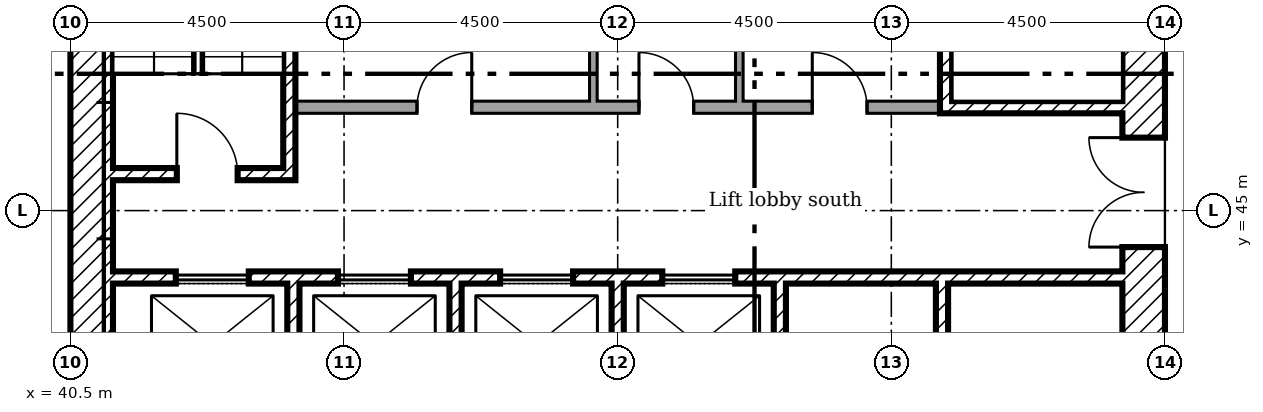
"""IFC4 building model, lengths in metres.
Left out: names, types, materials, properties, quantities, classifications, styles, units other than length and angle.
Written with IfcOpenShell. Run it as: python <this file> out.ifc"""

import sys

from ifc_helpers import new_model, si_unit, direction, frame, frame_2d, origin, place, context, subcontext, project, spatial, rectangle, extrude, element, fill, save


model = new_model("IFC4")
c1 = context("Model", 3, precision=1e-05, world=origin(), true_north=direction((0.0, 1.0)))
c2 = subcontext(c1, "Body", "Model", "MODEL_VIEW")
j1 = project(units=[si_unit("LENGTHUNIT", "METRE"), si_unit("PLANEANGLEUNIT", "RADIAN")], contexts=[c1])
p1 = place(None, origin())
s1 = spatial("IfcSite", under=j1, at=p1, CompositionType="ELEMENT")
p2 = place(p1, origin())
s2 = spatial("IfcBuilding", under=s1, at=p2, CompositionType="ELEMENT")
p3 = place(p2, frame((0.0, 0.0, 128.0)))
s3 = spatial("IfcBuildingStorey", under=s2, at=p3, CompositionType="ELEMENT", Elevation=128.0)
p4 = place(p3, frame((58.15, 40.5, 0.0), z_axis=(0.0, 0.0, 1.0), x_axis=(0.0, 1.0, 0.0)))
e1 = element("IfcWall", 1, at=p4, inside=s3, PredefinedType="SHEAR", context=c2, shape_type="SweptSolid", body=[
    extrude(rectangle(XDim=18.0, YDim=0.7, at=frame_2d((9.0, 0.0))), origin(), (0.0, 0.0, 1.0), 3.35),
])
p5 = place(p4, frame((13.15, 0.0, 0.0)))
e2 = element("IfcOpeningElement", 2, at=p5, cuts=e1, PredefinedType="OPENING", context=c2, shape_type="SweptSolid", body=[
    extrude(rectangle(XDim=1.2, YDim=2.1, at=frame_2d((0.6, 1.05))), frame((0.0, 0.36, 0.0), z_axis=(0.0, -1.0, 0.0), x_axis=(1.0, 0.0, 0.0)), (0.0, 0.0, 1.0), 0.72),
])
p6 = place(p4, frame((3.9, 0.0, 0.0)))
e3 = element("IfcOpeningElement", 3, at=p6, cuts=e1, PredefinedType="OPENING", context=c2, shape_type="SweptSolid", body=[
    extrude(rectangle(XDim=1.8, YDim=2.1, at=frame_2d((0.9, 1.05))), frame((0.0, 0.36, 0.0), z_axis=(0.0, -1.0, 0.0), x_axis=(1.0, 0.0, 0.0)), (0.0, 0.0, 1.0), 0.72),
])
p7 = place(p4, frame((11.525, 0.0, 0.0)))
e4 = element("IfcOpeningElement", 4, at=p7, cuts=e1, PredefinedType="OPENING", context=c2, shape_type="SweptSolid", body=[
    extrude(rectangle(XDim=1.0, YDim=2.1, at=frame_2d((0.5, 1.05))), frame((0.0, 0.36, 0.0), z_axis=(0.0, -1.0, 0.0), x_axis=(1.0, 0.0, 0.0)), (0.0, 0.0, 1.0), 0.72),
])
p8 = place(p3, frame((40.85, 40.5, 0.0), z_axis=(0.0, 0.0, 1.0), x_axis=(0.0, 1.0, 0.0)))
e5 = element("IfcWall", 5, at=p8, inside=s3, PredefinedType="SHEAR", context=c2, shape_type="SweptSolid", body=[
    extrude(rectangle(XDim=18.0, YDim=0.7, at=frame_2d((9.0, 0.0))), origin(), (0.0, 0.0, 1.0), 3.35),
])
for number, where, z_axis, x_axis in (
    (6, (44.167, 41.2, 0.0), (0.0, 0.0, 1.0), (0.0, 1.0, 0.0)),
    (7, (46.833, 41.2, 0.0), (0.0, 0.0, 1.0), (0.0, 1.0, 0.0)),
    (8, (49.5, 41.2, 0.0), (0.0, 0.0, 1.0), (0.0, 1.0, 0.0)),
    (9, (52.167, 41.2, 0.0), (0.0, 0.0, 1.0), (0.0, 1.0, 0.0)),
    (10, (54.833, 41.2, 0.0), (0.0, 0.0, 1.0), (0.0, 1.0, 0.0)),
):
    element("IfcWall", number, at=place(p3, frame(where, z_axis=z_axis, x_axis=x_axis)), inside=s3, PredefinedType="SHEAR", context=c2, shape_type="SweptSolid", body=[
        extrude(rectangle(XDim=2.6, YDim=0.2, at=frame_2d((1.3, 0.0))), origin(), (0.0, 0.0, 1.0), 3.35),
    ])
p9 = place(p3, frame((41.2, 43.9, 0.0)))
e11 = element("IfcWall", 11, at=p9, inside=s3, PredefinedType="SHEAR", context=c2, shape_type="SweptSolid", body=[
    extrude(rectangle(XDim=16.6, YDim=0.2, at=frame_2d((8.3, 0.0))), origin(), (0.0, 0.0, 1.0), 3.35),
])
p10 = place(p9, frame((1.033, 0.0, 0.0)))
e12 = element("IfcOpeningElement", 12, at=p10, cuts=e11, PredefinedType="OPENING", context=c2, shape_type="SweptSolid", body=[
    extrude(rectangle(XDim=1.2, YDim=2.1, at=frame_2d((0.6, 1.05))), frame((0.0, 0.11, 0.0), z_axis=(0.0, -1.0, 0.0), x_axis=(1.0, 0.0, 0.0)), (0.0, 0.0, 1.0), 0.22),
])
p11 = place(p9, frame((3.7, 0.0, 0.0)))
e13 = element("IfcOpeningElement", 13, at=p11, cuts=e11, PredefinedType="OPENING", context=c2, shape_type="SweptSolid", body=[
    extrude(rectangle(XDim=1.2, YDim=2.1, at=frame_2d((0.6, 1.05))), frame((0.0, 0.11, 0.0), z_axis=(0.0, -1.0, 0.0), x_axis=(1.0, 0.0, 0.0)), (0.0, 0.0, 1.0), 0.22),
])
p12 = place(p9, frame((6.367, 0.0, 0.0)))
e14 = element("IfcOpeningElement", 14, at=p12, cuts=e11, PredefinedType="OPENING", context=c2, shape_type="SweptSolid", body=[
    extrude(rectangle(XDim=1.2, YDim=2.1, at=frame_2d((0.6, 1.05))), frame((0.0, 0.11, 0.0), z_axis=(0.0, -1.0, 0.0), x_axis=(1.0, 0.0, 0.0)), (0.0, 0.0, 1.0), 0.22),
])
p13 = place(p9, frame((9.033, 0.0, 0.0)))
e15 = element("IfcOpeningElement", 15, at=p13, cuts=e11, PredefinedType="OPENING", context=c2, shape_type="SweptSolid", body=[
    extrude(rectangle(XDim=1.2, YDim=2.1, at=frame_2d((0.6, 1.05))), frame((0.0, 0.11, 0.0), z_axis=(0.0, -1.0, 0.0), x_axis=(1.0, 0.0, 0.0)), (0.0, 0.0, 1.0), 0.22),
])
p14 = place(p3, frame((44.1, 45.5, 0.0), z_axis=(0.0, 0.0, 1.0), x_axis=(0.0, 1.0, 0.0)))
e16 = element("IfcWall", 16, at=p14, inside=s3, PredefinedType="SHEAR", context=c2, shape_type="SweptSolid", body=[
    extrude(rectangle(XDim=6.9, YDim=0.2, at=frame_2d((3.45, 0.0))), origin(), (0.0, 0.0, 1.0), 3.35),
])
p15 = place(p3, frame((41.2, 45.6, 0.0)))
e17 = element("IfcWall", 17, at=p15, inside=s3, PredefinedType="SHEAR", context=c2, shape_type="SweptSolid", body=[
    extrude(rectangle(XDim=2.8, YDim=0.2, at=frame_2d((1.4, 0.0))), origin(), (0.0, 0.0, 1.0), 3.35),
])
p16 = place(p15, frame((1.05, 0.0, 0.0)))
e18 = element("IfcOpeningElement", 18, at=p16, cuts=e17, PredefinedType="OPENING", context=c2, shape_type="SweptSolid", body=[
    extrude(rectangle(XDim=1.0, YDim=2.1, at=frame_2d((0.5, 1.05))), frame((0.0, 0.11, 0.0), z_axis=(0.0, -1.0, 0.0), x_axis=(1.0, 0.0, 0.0)), (0.0, 0.0, 1.0), 0.22),
])
p17 = place(p3, frame((54.8, 46.7, 0.0)))
e19 = element("IfcWall", 19, at=p17, inside=s3, PredefinedType="SHEAR", context=c2, shape_type="SweptSolid", body=[
    extrude(rectangle(XDim=3.0, YDim=0.2, at=frame_2d((1.5, 0.0))), origin(), (0.0, 0.0, 1.0), 3.35),
])
p18 = place(p3, frame((54.9, 46.8, 0.0), z_axis=(0.0, 0.0, 1.0), x_axis=(0.0, 1.0, 0.0)))
e20 = element("IfcWall", 20, at=p18, inside=s3, PredefinedType="SHEAR", context=c2, shape_type="SweptSolid", body=[
    extrude(rectangle(XDim=6.5, YDim=0.2, at=frame_2d((3.25, 0.0))), origin(), (0.0, 0.0, 1.0), 3.35),
])
p19 = place(p3, frame((44.2, 46.7, 0.0)))
e21 = element("IfcWall", 21, at=p19, inside=s3, PredefinedType="PARTITIONING", context=c2, shape_type="SweptSolid", body=[
    extrude(rectangle(XDim=10.6, YDim=0.2, at=frame_2d((5.3, 0.0))), origin(), (0.0, 0.0, 1.0), 3.35),
])
p20 = place(p19, frame((2.0, 0.0, 0.0)))
e22 = element("IfcOpeningElement", 22, at=p20, cuts=e21, PredefinedType="OPENING", context=c2, shape_type="SweptSolid", body=[
    extrude(rectangle(XDim=0.9, YDim=2.1, at=frame_2d((0.45, 1.05))), frame((0.0, 0.11, 0.0), z_axis=(0.0, -1.0, 0.0), x_axis=(1.0, 0.0, 0.0)), (0.0, 0.0, 1.0), 0.22),
])
p21 = place(p19, frame((5.65, 0.0, 0.0)))
e23 = element("IfcOpeningElement", 23, at=p21, cuts=e21, PredefinedType="OPENING", context=c2, shape_type="SweptSolid", body=[
    extrude(rectangle(XDim=0.9, YDim=2.1, at=frame_2d((0.45, 1.05))), frame((0.0, 0.11, 0.0), z_axis=(0.0, -1.0, 0.0), x_axis=(1.0, 0.0, 0.0)), (0.0, 0.0, 1.0), 0.22),
])
p22 = place(p19, frame((8.5, 0.0, 0.0)))
e24 = element("IfcOpeningElement", 24, at=p22, cuts=e21, PredefinedType="OPENING", context=c2, shape_type="SweptSolid", body=[
    extrude(rectangle(XDim=0.9, YDim=2.1, at=frame_2d((0.45, 1.05))), frame((0.0, 0.11, 0.0), z_axis=(0.0, -1.0, 0.0), x_axis=(1.0, 0.0, 0.0)), (0.0, 0.0, 1.0), 0.22),
])
p23 = place(p3, frame((49.1, 46.8, 0.0), z_axis=(0.0, 0.0, 1.0), x_axis=(0.0, 1.0, 0.0)))
e25 = element("IfcWall", 25, at=p23, inside=s3, PredefinedType="PARTITIONING", context=c2, shape_type="SweptSolid", body=[
    extrude(rectangle(XDim=5.0, YDim=0.125, at=frame_2d((2.5, 0.0))), origin(), (0.0, 0.0, 1.0), 3.35),
])
p24 = place(p3, frame((51.5, 46.8, 0.0), z_axis=(0.0, 0.0, 1.0), x_axis=(0.0, 1.0, 0.0)))
e26 = element("IfcWall", 26, at=p24, inside=s3, PredefinedType="PARTITIONING", context=c2, shape_type="SweptSolid", body=[
    extrude(rectangle(XDim=2.762, YDim=0.125, at=frame_2d((1.381, 0.0))), origin(), (0.0, 0.0, 1.0), 3.35),
])
p25 = place(p6, origin())
e27 = element("IfcDoor", 27, at=p25, inside=s3, OperationType="DOUBLE_DOOR_SINGLE_SWING", PredefinedType="DOOR", context=c2, shape_type="SweptSolid", body=[
    extrude(rectangle(XDim=1.8, YDim=2.1, at=frame_2d((0.9, 1.05))), frame((0.0, 0.025, 0.0), z_axis=(0.0, -1.0, 0.0), x_axis=(1.0, 0.0, 0.0)), (0.0, 0.0, 1.0), 0.05),
])
fill(e3, e27)
p26 = place(p16, origin())
e28 = element("IfcDoor", 28, at=p26, inside=s3, OperationType="SINGLE_SWING_RIGHT", PredefinedType="DOOR", context=c2, shape_type="SweptSolid", body=[
    extrude(rectangle(XDim=1.0, YDim=2.1, at=frame_2d((0.5, 1.05))), frame((0.0, 0.025, 0.0), z_axis=(0.0, -1.0, 0.0), x_axis=(1.0, 0.0, 0.0)), (0.0, 0.0, 1.0), 0.05),
])
fill(e18, e28)
p27 = place(p20, origin())
e29 = element("IfcDoor", 29, at=p27, inside=s3, OperationType="SINGLE_SWING_LEFT", PredefinedType="DOOR", context=c2, shape_type="SweptSolid", body=[
    extrude(rectangle(XDim=0.9, YDim=2.1, at=frame_2d((0.45, 1.05))), frame((0.0, 0.025, 0.0), z_axis=(0.0, -1.0, 0.0), x_axis=(1.0, 0.0, 0.0)), (0.0, 0.0, 1.0), 0.05),
])
fill(e22, e29)
p28 = place(p21, origin())
e30 = element("IfcDoor", 30, at=p28, inside=s3, OperationType="SINGLE_SWING_RIGHT", PredefinedType="DOOR", context=c2, shape_type="SweptSolid", body=[
    extrude(rectangle(XDim=0.9, YDim=2.1, at=frame_2d((0.45, 1.05))), frame((0.0, 0.025, 0.0), z_axis=(0.0, -1.0, 0.0), x_axis=(1.0, 0.0, 0.0)), (0.0, 0.0, 1.0), 0.05),
])
fill(e23, e30)
p29 = place(p22, origin())
e31 = element("IfcDoor", 31, at=p29, inside=s3, OperationType="SINGLE_SWING_RIGHT", PredefinedType="DOOR", context=c2, shape_type="SweptSolid", body=[
    extrude(rectangle(XDim=0.9, YDim=2.1, at=frame_2d((0.45, 1.05))), frame((0.0, 0.025, 0.0), z_axis=(0.0, -1.0, 0.0), x_axis=(1.0, 0.0, 0.0)), (0.0, 0.0, 1.0), 0.05),
])
fill(e24, e31)
p30 = place(p10, origin())
e32 = element("IfcDoor", 32, at=p30, inside=s3, OperationType="SLIDING_TO_LEFT", PredefinedType="DOOR", context=c2, shape_type="SweptSolid", body=[
    extrude(rectangle(XDim=1.2, YDim=2.1, at=frame_2d((0.6, 1.05))), frame((0.0, 0.025, 0.0), z_axis=(0.0, -1.0, 0.0), x_axis=(1.0, 0.0, 0.0)), (0.0, 0.0, 1.0), 0.05),
])
fill(e12, e32)
p31 = place(p11, origin())
e33 = element("IfcDoor", 33, at=p31, inside=s3, OperationType="SLIDING_TO_LEFT", PredefinedType="DOOR", context=c2, shape_type="SweptSolid", body=[
    extrude(rectangle(XDim=1.2, YDim=2.1, at=frame_2d((0.6, 1.05))), frame((0.0, 0.025, 0.0), z_axis=(0.0, -1.0, 0.0), x_axis=(1.0, 0.0, 0.0)), (0.0, 0.0, 1.0), 0.05),
])
fill(e13, e33)
p32 = place(p12, origin())
e34 = element("IfcDoor", 34, at=p32, inside=s3, OperationType="SLIDING_TO_LEFT", PredefinedType="DOOR", context=c2, shape_type="SweptSolid", body=[
    extrude(rectangle(XDim=1.2, YDim=2.1, at=frame_2d((0.6, 1.05))), frame((0.0, 0.025, 0.0), z_axis=(0.0, -1.0, 0.0), x_axis=(1.0, 0.0, 0.0)), (0.0, 0.0, 1.0), 0.05),
])
fill(e14, e34)
p33 = place(p13, origin())
e35 = element("IfcDoor", 35, at=p33, inside=s3, OperationType="SLIDING_TO_LEFT", PredefinedType="DOOR", context=c2, shape_type="SweptSolid", body=[
    extrude(rectangle(XDim=1.2, YDim=2.1, at=frame_2d((0.6, 1.05))), frame((0.0, 0.025, 0.0), z_axis=(0.0, -1.0, 0.0), x_axis=(1.0, 0.0, 0.0)), (0.0, 0.0, 1.0), 0.05),
])
fill(e15, e35)
save(model, sys.argv[1])
